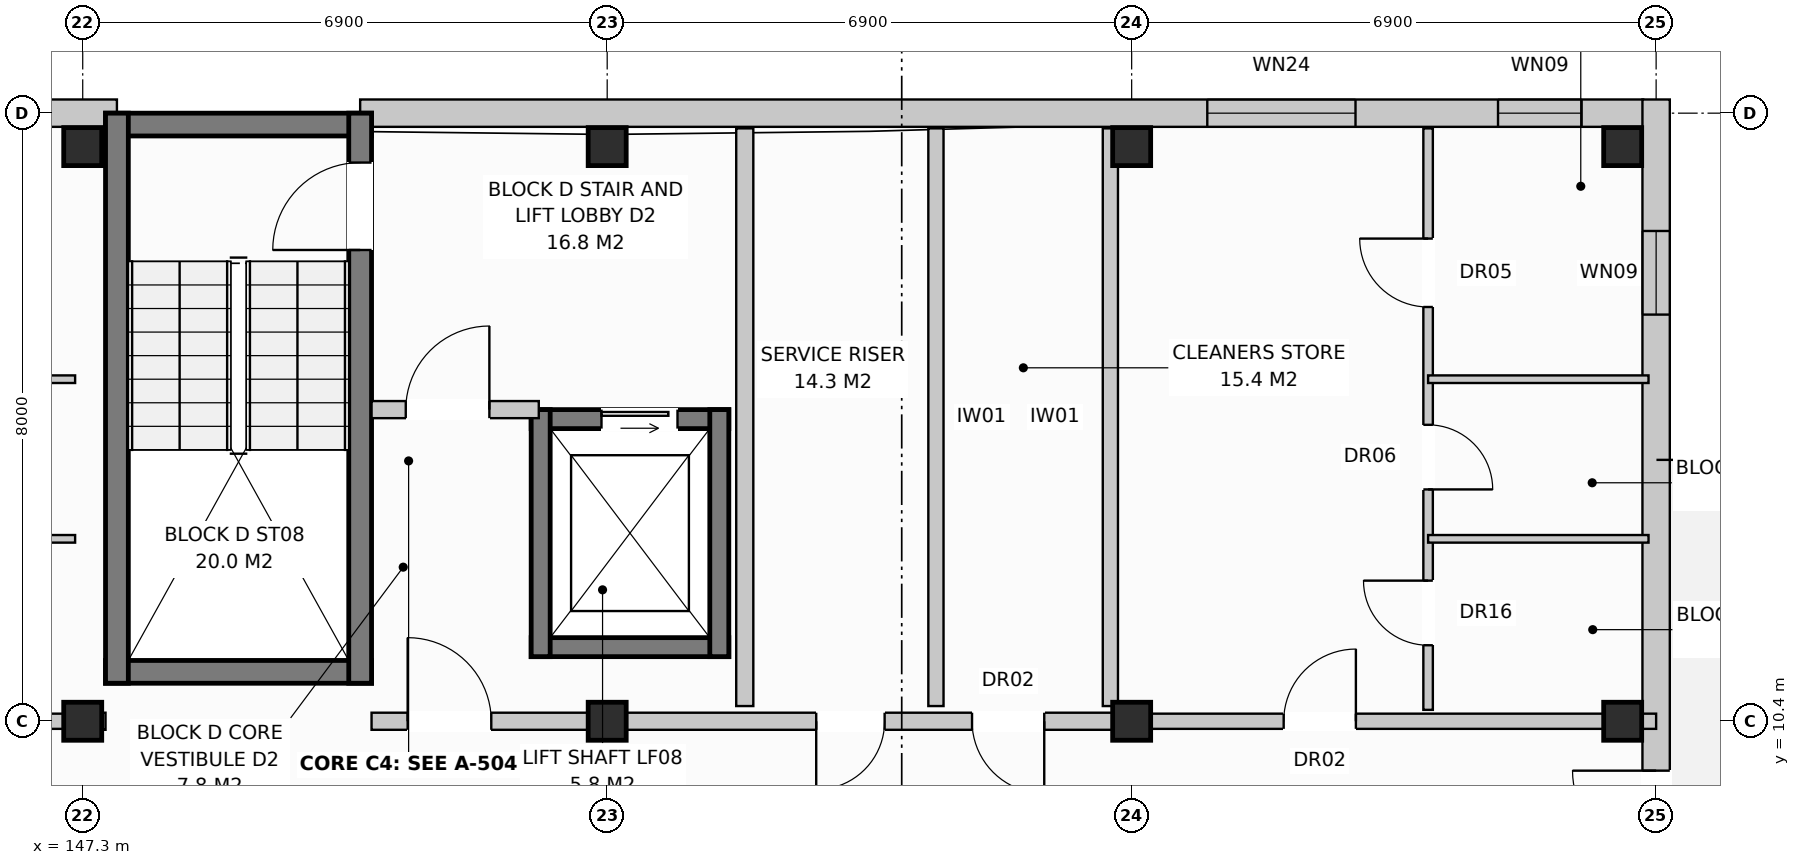
"""IFC4 building model, lengths in metres.
Left out: names, types, materials, properties, quantities, classifications, styles, units other than length and angle.
Written with IfcOpenShell. Run it as: python <this file> out.ifc"""

import sys

from ifc_helpers import new_model, si_unit, direction, frame, frame_2d, origin, origin_with_axes, origin_2d, place, context, subcontext, project, spatial, rectangle, extrude, element, fill, save


model = new_model("IFC4")
c1 = context("Model", 3, precision=1e-05, world=origin(), true_north=direction((0.0, 1.0)))
c2 = subcontext(c1, "Body", "Model", "MODEL_VIEW")
j1 = project(units=[si_unit("LENGTHUNIT", "METRE"), si_unit("PLANEANGLEUNIT", "RADIAN")], contexts=[c1])
p1 = place(None, origin())
s1 = spatial("IfcSite", under=j1, at=p1, CompositionType="ELEMENT")
p2 = place(p1, origin())
s2 = spatial("IfcBuilding", under=s1, at=p2, CompositionType="ELEMENT")
p3 = place(p2, frame((0.0, 0.0, 11.2)))
s3 = spatial("IfcBuildingStorey", under=s2, at=p3, CompositionType="ELEMENT", Elevation=11.2)
for number, where, z_axis, x_axis in (
    (1, (147.3, 10.4, 0.0), (0.0, 0.0, 1.0), (1.0, 0.0, 0.0)),
    (2, (147.3, 17.96, 0.0), (0.0, 0.0, 1.0), (1.0, 0.0, 0.0)),
    (3, (154.2, 10.4, 0.0), (0.0, 0.0, 1.0), (1.0, 0.0, 0.0)),
    (4, (154.2, 17.96, 0.0), (0.0, 0.0, 1.0), (1.0, 0.0, 0.0)),
    (5, (161.1, 10.4, 0.0), (0.0, 0.0, 1.0), (1.0, 0.0, 0.0)),
    (6, (161.1, 17.96, 0.0), (0.0, 0.0, 1.0), (1.0, 0.0, 0.0)),
    (7, (167.56, 10.4, 0.0), (0.0, 0.0, 1.0), (1.0, 0.0, 0.0)),
    (8, (167.56, 17.96, 0.0), (0.0, 0.0, 1.0), (1.0, 0.0, 0.0)),
):
    element("IfcColumn", number, at=place(p3, frame(where, z_axis=z_axis, x_axis=x_axis)), inside=s3, PredefinedType="COLUMN", context=c2, shape_type="SweptSolid", body=[
        extrude(rectangle(XDim=0.5, YDim=0.5, at=origin_2d()), origin(), (0.0, 0.0, 1.0), 3.2),
    ])
p4 = place(p3, frame((130.25, 18.4, 0.0), z_axis=(0.0, 0.0, 1.0), x_axis=(1.0, 0.0, 0.0)))
e9 = element("IfcWall", 9, at=p4, inside=s3, PredefinedType="STANDARD", context=c2, shape_type="SweptSolid", body=[
    extrude(rectangle(XDim=17.5, YDim=0.36, at=frame_2d((8.75, 0.0))), origin(), (0.0, 0.0, 1.0), 2.94),
])
p5 = place(p4, frame((11.949, 0.0, 0.0)))
e10 = element("IfcOpeningElement", 10, at=p5, cuts=e9, PredefinedType="OPENING", context=c2, shape_type="SweptSolid", body=[
    extrude(rectangle(XDim=1.05, YDim=2.12, at=frame_2d((0.525, 1.06))), frame((0.0, 0.192, 0.0), z_axis=(0.0, -1.0, 0.0), x_axis=(1.0, 0.0, 0.0)), (0.0, 0.0, 1.0), 0.384),
])
p6 = place(p4, frame((14.97, 0.0, 0.72)))
e11 = element("IfcOpeningElement", 11, at=p6, cuts=e9, PredefinedType="OPENING", context=c2, shape_type="SweptSolid", body=[
    extrude(rectangle(XDim=1.1, YDim=1.5, at=frame_2d((0.55, 0.75))), frame((0.0, 0.192, 0.0), z_axis=(0.0, -1.0, 0.0), x_axis=(1.0, 0.0, 0.0)), (0.0, 0.0, 1.0), 0.384),
])
p7 = place(p3, frame((150.95, 18.4, 0.0), z_axis=(0.0, 0.0, 1.0), x_axis=(1.0, 0.0, 0.0)))
e12 = element("IfcWall", 12, at=p7, inside=s3, PredefinedType="STANDARD", context=c2, shape_type="SweptSolid", body=[
    extrude(rectangle(XDim=16.88, YDim=0.36, at=frame_2d((8.44, 0.0))), origin(), (0.0, 0.0, 1.0), 2.94),
])
p8 = place(p7, frame((11.145, 0.0, 0.8)))
e13 = element("IfcOpeningElement", 13, at=p8, cuts=e12, PredefinedType="OPENING", context=c2, shape_type="SweptSolid", body=[
    extrude(rectangle(XDim=1.95, YDim=1.65, at=frame_2d((0.975, 0.825))), frame((0.0, 0.192, 0.0), z_axis=(0.0, -1.0, 0.0), x_axis=(1.0, 0.0, 0.0)), (0.0, 0.0, 1.0), 0.384),
])
p9 = place(p7, frame((14.97, 0.0, 0.72)))
e14 = element("IfcOpeningElement", 14, at=p9, cuts=e12, PredefinedType="OPENING", context=c2, shape_type="SweptSolid", body=[
    extrude(rectangle(XDim=1.1, YDim=1.5, at=frame_2d((0.55, 0.75))), frame((0.0, 0.192, 0.0), z_axis=(0.0, -1.0, 0.0), x_axis=(1.0, 0.0, 0.0)), (0.0, 0.0, 1.0), 0.384),
])
p10 = place(p3, frame((168.0, -0.18, 0.0), z_axis=(0.0, 0.0, 1.0), x_axis=(0.0, 1.0, 0.0)))
e15 = element("IfcWall", 15, at=p10, inside=s3, PredefinedType="STANDARD", context=c2, shape_type="SweptSolid", body=[
    extrude(rectangle(XDim=18.76, YDim=0.36, at=frame_2d((9.38, 0.0))), origin(), (0.0, 0.0, 1.0), 2.94),
])
p11 = place(p10, frame((8.83, 0.0, 0.0)))
e16 = element("IfcOpeningElement", 16, at=p11, cuts=e15, PredefinedType="OPENING", context=c2, shape_type="SweptSolid", body=[
    extrude(rectangle(XDim=1.1, YDim=2.1, at=frame_2d((0.55, 1.05))), frame((0.0, 0.192, 0.0), z_axis=(0.0, -1.0, 0.0), x_axis=(1.0, 0.0, 0.0)), (0.0, 0.0, 1.0), 0.384),
])
p12 = place(p10, frame((1.73, 0.0, 0.72)))
e17 = element("IfcOpeningElement", 17, at=p12, cuts=e15, PredefinedType="OPENING", context=c2, shape_type="SweptSolid", body=[
    extrude(rectangle(XDim=1.1, YDim=1.5, at=frame_2d((0.55, 0.75))), frame((0.0, 0.192, 0.0), z_axis=(0.0, -1.0, 0.0), x_axis=(1.0, 0.0, 0.0)), (0.0, 0.0, 1.0), 0.384),
])
p13 = place(p10, frame((15.93, 0.0, 0.72)))
e18 = element("IfcOpeningElement", 18, at=p13, cuts=e15, PredefinedType="OPENING", context=c2, shape_type="SweptSolid", body=[
    extrude(rectangle(XDim=1.1, YDim=1.5, at=frame_2d((0.55, 0.75))), frame((0.0, 0.192, 0.0), z_axis=(0.0, -1.0, 0.0), x_axis=(1.0, 0.0, 0.0)), (0.0, 0.0, 1.0), 0.384),
])
for number, where, z_axis, x_axis in (
    (19, (147.6, 18.25, 0.0), (0.0, 0.0, 1.0), (1.0, 0.0, 0.0)),
    (20, (147.6, 11.05, 0.0), (0.0, 0.0, 1.0), (1.0, 0.0, 0.0)),
):
    element("IfcWall", number, at=place(p3, frame(where, z_axis=z_axis, x_axis=x_axis)), inside=s3, PredefinedType="SHEAR", context=c2, shape_type="SweptSolid", body=[
        extrude(rectangle(XDim=3.5, YDim=0.3, at=frame_2d((1.75, 0.0))), origin(), (0.0, 0.0, 1.0), 2.94),
    ])
p14 = place(p3, frame((147.75, 10.9, 0.0), z_axis=(0.0, 0.0, 1.0), x_axis=(0.0, 1.0, 0.0)))
e21 = element("IfcWall", 21, at=p14, inside=s3, PredefinedType="SHEAR", context=c2, shape_type="SweptSolid", body=[
    extrude(rectangle(XDim=7.5, YDim=0.3, at=frame_2d((3.75, 0.0))), origin(), (0.0, 0.0, 1.0), 2.94),
])
p15 = place(p3, frame((150.95, 10.9, 0.0), z_axis=(0.0, 0.0, 1.0), x_axis=(0.0, 1.0, 0.0)))
e22 = element("IfcWall", 22, at=p15, inside=s3, PredefinedType="SHEAR", context=c2, shape_type="SweptSolid", body=[
    extrude(rectangle(XDim=7.5, YDim=0.3, at=frame_2d((3.75, 0.0))), origin(), (0.0, 0.0, 1.0), 2.94),
])
p16 = place(p15, frame((5.7, 0.0, 0.0)))
e23 = element("IfcOpeningElement", 23, at=p16, cuts=e22, PredefinedType="OPENING", context=c2, shape_type="SweptSolid", body=[
    extrude(rectangle(XDim=1.15, YDim=2.15, at=frame_2d((0.575, 1.075))), frame((0.0, 0.162, 0.0), z_axis=(0.0, -1.0, 0.0), x_axis=(1.0, 0.0, 0.0)), (0.0, 0.0, 1.0), 0.324),
])
p17 = place(p3, frame((153.2, 14.375, 0.0), z_axis=(0.0, 0.0, 1.0), x_axis=(1.0, 0.0, 0.0)))
e24 = element("IfcWall", 24, at=p17, inside=s3, PredefinedType="SHEAR", context=c2, shape_type="SweptSolid", body=[
    extrude(rectangle(XDim=2.6, YDim=0.25, at=frame_2d((1.3, 0.0))), origin(), (0.0, 0.0, 1.0), 2.94),
])
p18 = place(p17, frame((0.925, 0.0, 0.0)))
e25 = element("IfcOpeningElement", 25, at=p18, cuts=e24, PredefinedType="OPENING", context=c2, shape_type="SweptSolid", body=[
    extrude(rectangle(XDim=1.0, YDim=2.1, at=frame_2d((0.5, 1.05))), frame((0.0, 0.137, 0.0), z_axis=(0.0, -1.0, 0.0), x_axis=(1.0, 0.0, 0.0)), (0.0, 0.0, 1.0), 0.274),
])
p19 = place(p3, frame((153.2, 11.375, 0.0), z_axis=(0.0, 0.0, 1.0), x_axis=(1.0, 0.0, 0.0)))
e26 = element("IfcWall", 26, at=p19, inside=s3, PredefinedType="SHEAR", context=c2, shape_type="SweptSolid", body=[
    extrude(rectangle(XDim=2.6, YDim=0.25, at=frame_2d((1.3, 0.0))), origin(), (0.0, 0.0, 1.0), 2.94),
])
for number, where, z_axis, x_axis in (
    (27, (153.325, 11.25, 0.0), (0.0, 0.0, 1.0), (0.0, 1.0, 0.0)),
    (28, (155.675, 11.25, 0.0), (0.0, 0.0, 1.0), (0.0, 1.0, 0.0)),
):
    element("IfcWall", number, at=place(p3, frame(where, z_axis=z_axis, x_axis=x_axis)), inside=s3, PredefinedType="SHEAR", context=c2, shape_type="SweptSolid", body=[
        extrude(rectangle(XDim=3.25, YDim=0.25, at=frame_2d((1.625, 0.0))), origin(), (0.0, 0.0, 1.0), 2.94),
    ])
p20 = place(p3, frame((156.01, 10.6, 0.0), z_axis=(0.0, 0.0, 1.0), x_axis=(0.0, 1.0, 0.0)))
e29 = element("IfcWall", 29, at=p20, inside=s3, PredefinedType="PARTITIONING", context=c2, shape_type="SweptSolid", body=[
    extrude(rectangle(XDim=7.6, YDim=0.225, at=frame_2d((3.8, 0.0))), origin(), (0.0, 0.0, 1.0), 2.59),
])
p21 = place(p3, frame((151.1, 14.5, 0.0), z_axis=(0.0, 0.0, 1.0), x_axis=(1.0, 0.0, 0.0)))
e30 = element("IfcWall", 30, at=p21, inside=s3, PredefinedType="PARTITIONING", context=c2, shape_type="SweptSolid", body=[
    extrude(rectangle(XDim=2.2, YDim=0.225, at=frame_2d((1.1, 0.0))), origin(), (0.0, 0.0, 1.0), 2.94),
])
p22 = place(p21, frame((0.45, 0.0, 0.0)))
e31 = element("IfcOpeningElement", 31, at=p22, cuts=e30, PredefinedType="OPENING", context=c2, shape_type="SweptSolid", body=[
    extrude(rectangle(XDim=1.1, YDim=2.15, at=frame_2d((0.55, 1.075))), frame((0.0, 0.125, 0.0), z_axis=(0.0, -1.0, 0.0), x_axis=(1.0, 0.0, 0.0)), (0.0, 0.0, 1.0), 0.249),
])
p23 = place(p3, frame((147.3, 10.4, 0.0), z_axis=(0.0, 0.0, 1.0), x_axis=(1.0, 0.0, 0.0)))
e32 = element("IfcWall", 32, at=p23, inside=s3, PredefinedType="PARTITIONING", context=c2, shape_type="SweptSolid", body=[
    extrude(rectangle(XDim=0.3, YDim=0.225, at=frame_2d((0.15, 0.0))), origin(), (0.0, 0.0, 1.0), 2.94),
])
p24 = place(p3, frame((158.525, 10.6, 0.0), z_axis=(0.0, 0.0, 1.0), x_axis=(0.0, 1.0, 0.0)))
e33 = element("IfcWall", 33, at=p24, inside=s3, PredefinedType="PARTITIONING", context=c2, shape_type="SweptSolid", body=[
    extrude(rectangle(XDim=7.6, YDim=0.2, at=frame_2d((3.8, 0.0))), origin(), (0.0, 0.0, 1.0), 2.94),
])
p25 = place(p3, frame((160.82, 10.6, 0.0), z_axis=(0.0, 0.0, 1.0), x_axis=(0.0, 1.0, 0.0)))
e34 = element("IfcWall", 34, at=p25, inside=s3, PredefinedType="PARTITIONING", context=c2, shape_type="SweptSolid", body=[
    extrude(rectangle(XDim=7.6, YDim=0.2, at=frame_2d((3.8, 0.0))), origin(), (0.0, 0.0, 1.0), 2.38),
])
p26 = place(p3, frame((151.1, 10.4, 0.0), z_axis=(0.0, 0.0, 1.0), x_axis=(1.0, 0.0, 0.0)))
e35 = element("IfcWall", 35, at=p26, inside=s3, PredefinedType="PARTITIONING", context=c2, shape_type="SweptSolid", body=[
    extrude(rectangle(XDim=10.0, YDim=0.225, at=frame_2d((5.0, 0.0))), origin(), (0.0, 0.0, 1.0), 2.38),
])
p27 = place(p26, frame((0.475, 0.0, 0.0)))
e36 = element("IfcOpeningElement", 36, at=p27, cuts=e35, PredefinedType="OPENING", context=c2, shape_type="SweptSolid", body=[
    extrude(rectangle(XDim=1.1, YDim=2.15, at=frame_2d((0.55, 1.075))), frame((0.0, 0.125, 0.0), z_axis=(0.0, -1.0, 0.0), x_axis=(1.0, 0.0, 0.0)), (0.0, 0.0, 1.0), 0.249),
])
p28 = place(p26, frame((5.85, 0.0, 0.0)))
e37 = element("IfcOpeningElement", 37, at=p28, cuts=e35, PredefinedType="OPENING", context=c2, shape_type="SweptSolid", body=[
    extrude(rectangle(XDim=0.9, YDim=2.1, at=frame_2d((0.45, 1.05))), frame((0.0, 0.125, 0.0), z_axis=(0.0, -1.0, 0.0), x_axis=(1.0, 0.0, 0.0)), (0.0, 0.0, 1.0), 0.249),
])
p29 = place(p26, frame((7.9, 0.0, 0.0)))
e38 = element("IfcOpeningElement", 38, at=p29, cuts=e35, PredefinedType="OPENING", context=c2, shape_type="SweptSolid", body=[
    extrude(rectangle(XDim=0.95, YDim=2.15, at=frame_2d((0.475, 1.075))), frame((0.0, 0.125, 0.0), z_axis=(0.0, -1.0, 0.0), x_axis=(1.0, 0.0, 0.0)), (0.0, 0.0, 1.0), 0.249),
])
p30 = place(p3, frame((140.4, 10.4, 0.0), z_axis=(0.0, 0.0, 1.0), x_axis=(1.0, 0.0, 0.0)))
e39 = element("IfcWall", 39, at=p30, inside=s3, PredefinedType="PARTITIONING", context=c2, shape_type="SweptSolid", body=[
    extrude(rectangle(XDim=6.9, YDim=0.2, at=frame_2d((3.45, 0.0))), origin(), (0.0, 0.0, 1.0), 2.38),
])
p31 = place(p30, frame((2.0, 0.0, 0.0)))
e40 = element("IfcOpeningElement", 40, at=p31, cuts=e39, PredefinedType="OPENING", context=c2, shape_type="SweptSolid", body=[
    extrude(rectangle(XDim=0.95, YDim=2.15, at=frame_2d((0.475, 1.075))), frame((0.0, 0.112, 0.0), z_axis=(0.0, -1.0, 0.0), x_axis=(1.0, 0.0, 0.0)), (0.0, 0.0, 1.0), 0.224),
])
for number, where, z_axis, x_axis in (
    (41, (144.3, 12.8, 0.0), (0.0, 0.0, 1.0), (1.0, 0.0, 0.0)),
    (42, (144.3, 14.9, 0.0), (0.0, 0.0, 1.0), (1.0, 0.0, 0.0)),
):
    element("IfcWall", number, at=place(p3, frame(where, z_axis=z_axis, x_axis=x_axis)), inside=s3, PredefinedType="PARTITIONING", context=c2, shape_type="SweptSolid", body=[
        extrude(rectangle(XDim=2.9, YDim=0.1, at=frame_2d((1.45, 0.0))), origin(), (0.0, 0.0, 1.0), 2.94),
    ])
p32 = place(p3, frame((161.1, 10.4, 0.0), z_axis=(0.0, 0.0, 1.0), x_axis=(1.0, 0.0, 0.0)))
e43 = element("IfcWall", 43, at=p32, inside=s3, PredefinedType="PARTITIONING", context=c2, shape_type="SweptSolid", body=[
    extrude(rectangle(XDim=6.9, YDim=0.2, at=frame_2d((3.45, 0.0))), origin(), (0.0, 0.0, 1.0), 2.38),
])
p33 = place(p32, frame((2.0, 0.0, 0.0)))
e44 = element("IfcOpeningElement", 44, at=p33, cuts=e43, PredefinedType="OPENING", context=c2, shape_type="SweptSolid", body=[
    extrude(rectangle(XDim=0.95, YDim=2.15, at=frame_2d((0.475, 1.075))), frame((0.0, 0.112, 0.0), z_axis=(0.0, -1.0, 0.0), x_axis=(1.0, 0.0, 0.0)), (0.0, 0.0, 1.0), 0.224),
])
p34 = place(p3, frame((165.0, 10.55, 0.0), z_axis=(0.0, 0.0, 1.0), x_axis=(0.0, 1.0, 0.0)))
e45 = element("IfcWall", 45, at=p34, inside=s3, PredefinedType="PARTITIONING", context=c2, shape_type="SweptSolid", body=[
    extrude(rectangle(XDim=7.65, YDim=0.125, at=frame_2d((3.825, 0.0))), origin(), (0.0, 0.0, 1.0), 2.94),
])
p35 = place(p34, frame((0.85, 0.0, 0.0)))
e46 = element("IfcOpeningElement", 46, at=p35, cuts=e45, PredefinedType="OPENING", context=c2, shape_type="SweptSolid", body=[
    extrude(rectangle(XDim=0.85, YDim=2.1, at=frame_2d((0.425, 1.05))), frame((0.0, 0.074, 0.0), z_axis=(0.0, -1.0, 0.0), x_axis=(1.0, 0.0, 0.0)), (0.0, 0.0, 1.0), 0.149),
])
p36 = place(p34, frame((2.9, 0.0, 0.0)))
e47 = element("IfcOpeningElement", 47, at=p36, cuts=e45, PredefinedType="OPENING", context=c2, shape_type="SweptSolid", body=[
    extrude(rectangle(XDim=0.85, YDim=2.05, at=frame_2d((0.425, 1.025))), frame((0.0, 0.074, 0.0), z_axis=(0.0, -1.0, 0.0), x_axis=(1.0, 0.0, 0.0)), (0.0, 0.0, 1.0), 0.149),
])
p37 = place(p34, frame((5.3, 0.0, 0.0)))
e48 = element("IfcOpeningElement", 48, at=p37, cuts=e45, PredefinedType="OPENING", context=c2, shape_type="SweptSolid", body=[
    extrude(rectangle(XDim=0.9, YDim=2.1, at=frame_2d((0.45, 1.05))), frame((0.0, 0.074, 0.0), z_axis=(0.0, -1.0, 0.0), x_axis=(1.0, 0.0, 0.0)), (0.0, 0.0, 1.0), 0.149),
])
for number, where, z_axis, x_axis in (
    (49, (165.0, 12.8, 0.0), (0.0, 0.0, 1.0), (1.0, 0.0, 0.0)),
    (50, (165.0, 14.9, 0.0), (0.0, 0.0, 1.0), (1.0, 0.0, 0.0)),
):
    element("IfcWall", number, at=place(p3, frame(where, z_axis=z_axis, x_axis=x_axis)), inside=s3, PredefinedType="PARTITIONING", context=c2, shape_type="SweptSolid", body=[
        extrude(rectangle(XDim=2.9, YDim=0.1, at=frame_2d((1.45, 0.0))), origin(), (0.0, 0.0, 1.0), 2.94),
    ])
p38 = place(p8, origin_with_axes())
e51 = element("IfcWindow", 51, at=p38, inside=s3, PartitioningType="SINGLE_PANEL", PredefinedType="WINDOW", context=c2, shape_type="SweptSolid", body=[
    extrude(rectangle(XDim=1.95, YDim=1.65, at=frame_2d((0.975, 0.825))), frame((0.0, 0.03, 0.0), z_axis=(0.0, -1.0, 0.0), x_axis=(1.0, 0.0, 0.0)), (0.0, 0.0, 1.0), 0.06),
])
fill(e13, e51)
p39 = place(p9, origin_with_axes())
e52 = element("IfcWindow", 52, at=p39, inside=s3, PartitioningType="SINGLE_PANEL", PredefinedType="WINDOW", context=c2, shape_type="SweptSolid", body=[
    extrude(rectangle(XDim=1.1, YDim=1.5, at=frame_2d((0.55, 0.75))), frame((0.0, 0.03, 0.0), z_axis=(0.0, -1.0, 0.0), x_axis=(1.0, 0.0, 0.0)), (0.0, 0.0, 1.0), 0.06),
])
fill(e14, e52)
p40 = place(p11, origin_with_axes())
e53 = element("IfcDoor", 53, at=p40, inside=s3, OperationType="SINGLE_SWING_RIGHT", PredefinedType="DOOR", context=c2, shape_type="SweptSolid", body=[
    extrude(rectangle(XDim=1.1, YDim=2.1, at=frame_2d((0.55, 1.05))), frame((0.0, 0.025, 0.0), z_axis=(0.0, -1.0, 0.0), x_axis=(1.0, 0.0, 0.0)), (0.0, 0.0, 1.0), 0.05),
])
fill(e16, e53)
p41 = place(p13, origin_with_axes())
e54 = element("IfcWindow", 54, at=p41, inside=s3, PartitioningType="SINGLE_PANEL", PredefinedType="WINDOW", context=c2, shape_type="SweptSolid", body=[
    extrude(rectangle(XDim=1.1, YDim=1.5, at=frame_2d((0.55, 0.75))), frame((0.0, 0.03, 0.0), z_axis=(0.0, -1.0, 0.0), x_axis=(1.0, 0.0, 0.0)), (0.0, 0.0, 1.0), 0.06),
])
fill(e18, e54)
p42 = place(p16, origin_with_axes())
e55 = element("IfcDoor", 55, at=p42, inside=s3, OperationType="SINGLE_SWING_LEFT", PredefinedType="DOOR", context=c2, shape_type="SweptSolid", body=[
    extrude(rectangle(XDim=1.15, YDim=2.15, at=frame_2d((0.575, 1.075))), frame((0.0, 0.025, 0.0), z_axis=(0.0, -1.0, 0.0), x_axis=(1.0, 0.0, 0.0)), (0.0, 0.0, 1.0), 0.05),
])
fill(e23, e55)
p43 = place(p18, origin_with_axes())
e56 = element("IfcDoor", 56, at=p43, inside=s3, OperationType="SLIDING_TO_LEFT", PredefinedType="DOOR", context=c2, shape_type="SweptSolid", body=[
    extrude(rectangle(XDim=1.0, YDim=2.1, at=frame_2d((0.5, 1.05))), frame((0.0, 0.025, 0.0), z_axis=(0.0, -1.0, 0.0), x_axis=(1.0, 0.0, 0.0)), (0.0, 0.0, 1.0), 0.05),
])
fill(e25, e56)
p44 = place(p22, origin_with_axes())
e57 = element("IfcDoor", 57, at=p44, inside=s3, OperationType="SINGLE_SWING_RIGHT", PredefinedType="DOOR", context=c2, shape_type="SweptSolid", body=[
    extrude(rectangle(XDim=1.1, YDim=2.15, at=frame_2d((0.55, 1.075))), frame((0.0, 0.025, 0.0), z_axis=(0.0, -1.0, 0.0), x_axis=(1.0, 0.0, 0.0)), (0.0, 0.0, 1.0), 0.05),
])
fill(e31, e57)
p45 = place(p27, origin_with_axes())
e58 = element("IfcDoor", 58, at=p45, inside=s3, OperationType="SINGLE_SWING_LEFT", PredefinedType="DOOR", context=c2, shape_type="SweptSolid", body=[
    extrude(rectangle(XDim=1.1, YDim=2.15, at=frame_2d((0.55, 1.075))), frame((0.0, 0.025, 0.0), z_axis=(0.0, -1.0, 0.0), x_axis=(1.0, 0.0, 0.0)), (0.0, 0.0, 1.0), 0.05),
])
fill(e36, e58)
p46 = place(p28, frame((0.9, 0.0, 0.0), z_axis=(0.0, 0.0, 1.0), x_axis=(-1.0, 0.0, 0.0)))
e59 = element("IfcDoor", 59, at=p46, inside=s3, OperationType="SINGLE_SWING_LEFT", PredefinedType="DOOR", context=c2, shape_type="SweptSolid", body=[
    extrude(rectangle(XDim=0.9, YDim=2.1, at=frame_2d((0.45, 1.05))), frame((0.0, 0.025, 0.0), z_axis=(0.0, -1.0, 0.0), x_axis=(1.0, 0.0, 0.0)), (0.0, 0.0, 1.0), 0.05),
])
fill(e37, e59)
p47 = place(p29, frame((0.95, 0.0, 0.0), z_axis=(0.0, 0.0, 1.0), x_axis=(-1.0, 0.0, 0.0)))
e60 = element("IfcDoor", 60, at=p47, inside=s3, OperationType="SINGLE_SWING_RIGHT", PredefinedType="DOOR", context=c2, shape_type="SweptSolid", body=[
    extrude(rectangle(XDim=0.95, YDim=2.15, at=frame_2d((0.475, 1.075))), frame((0.0, 0.025, 0.0), z_axis=(0.0, -1.0, 0.0), x_axis=(1.0, 0.0, 0.0)), (0.0, 0.0, 1.0), 0.05),
])
fill(e38, e60)
p48 = place(p33, origin_with_axes())
e61 = element("IfcDoor", 61, at=p48, inside=s3, OperationType="SINGLE_SWING_RIGHT", PredefinedType="DOOR", context=c2, shape_type="SweptSolid", body=[
    extrude(rectangle(XDim=0.95, YDim=2.15, at=frame_2d((0.475, 1.075))), frame((0.0, 0.025, 0.0), z_axis=(0.0, -1.0, 0.0), x_axis=(1.0, 0.0, 0.0)), (0.0, 0.0, 1.0), 0.05),
])
fill(e44, e61)
p49 = place(p35, origin_with_axes())
e62 = element("IfcDoor", 62, at=p49, inside=s3, OperationType="SINGLE_SWING_RIGHT", PredefinedType="DOOR", context=c2, shape_type="SweptSolid", body=[
    extrude(rectangle(XDim=0.85, YDim=2.1, at=frame_2d((0.425, 1.05))), frame((0.0, 0.025, 0.0), z_axis=(0.0, -1.0, 0.0), x_axis=(1.0, 0.0, 0.0)), (0.0, 0.0, 1.0), 0.05),
])
fill(e46, e62)
p50 = place(p36, frame((0.85, 0.0, 0.0), z_axis=(0.0, 0.0, 1.0), x_axis=(-1.0, 0.0, 0.0)))
e63 = element("IfcDoor", 63, at=p50, inside=s3, OperationType="SINGLE_SWING_LEFT", PredefinedType="DOOR", context=c2, shape_type="SweptSolid", body=[
    extrude(rectangle(XDim=0.85, YDim=2.05, at=frame_2d((0.425, 1.025))), frame((0.0, 0.025, 0.0), z_axis=(0.0, -1.0, 0.0), x_axis=(1.0, 0.0, 0.0)), (0.0, 0.0, 1.0), 0.05),
])
fill(e47, e63)
p51 = place(p37, origin_with_axes())
e64 = element("IfcDoor", 64, at=p51, inside=s3, OperationType="SINGLE_SWING_RIGHT", PredefinedType="DOOR", context=c2, shape_type="SweptSolid", body=[
    extrude(rectangle(XDim=0.9, YDim=2.1, at=frame_2d((0.45, 1.05))), frame((0.0, 0.025, 0.0), z_axis=(0.0, -1.0, 0.0), x_axis=(1.0, 0.0, 0.0)), (0.0, 0.0, 1.0), 0.05),
])
fill(e48, e64)
save(model, sys.argv[1])
